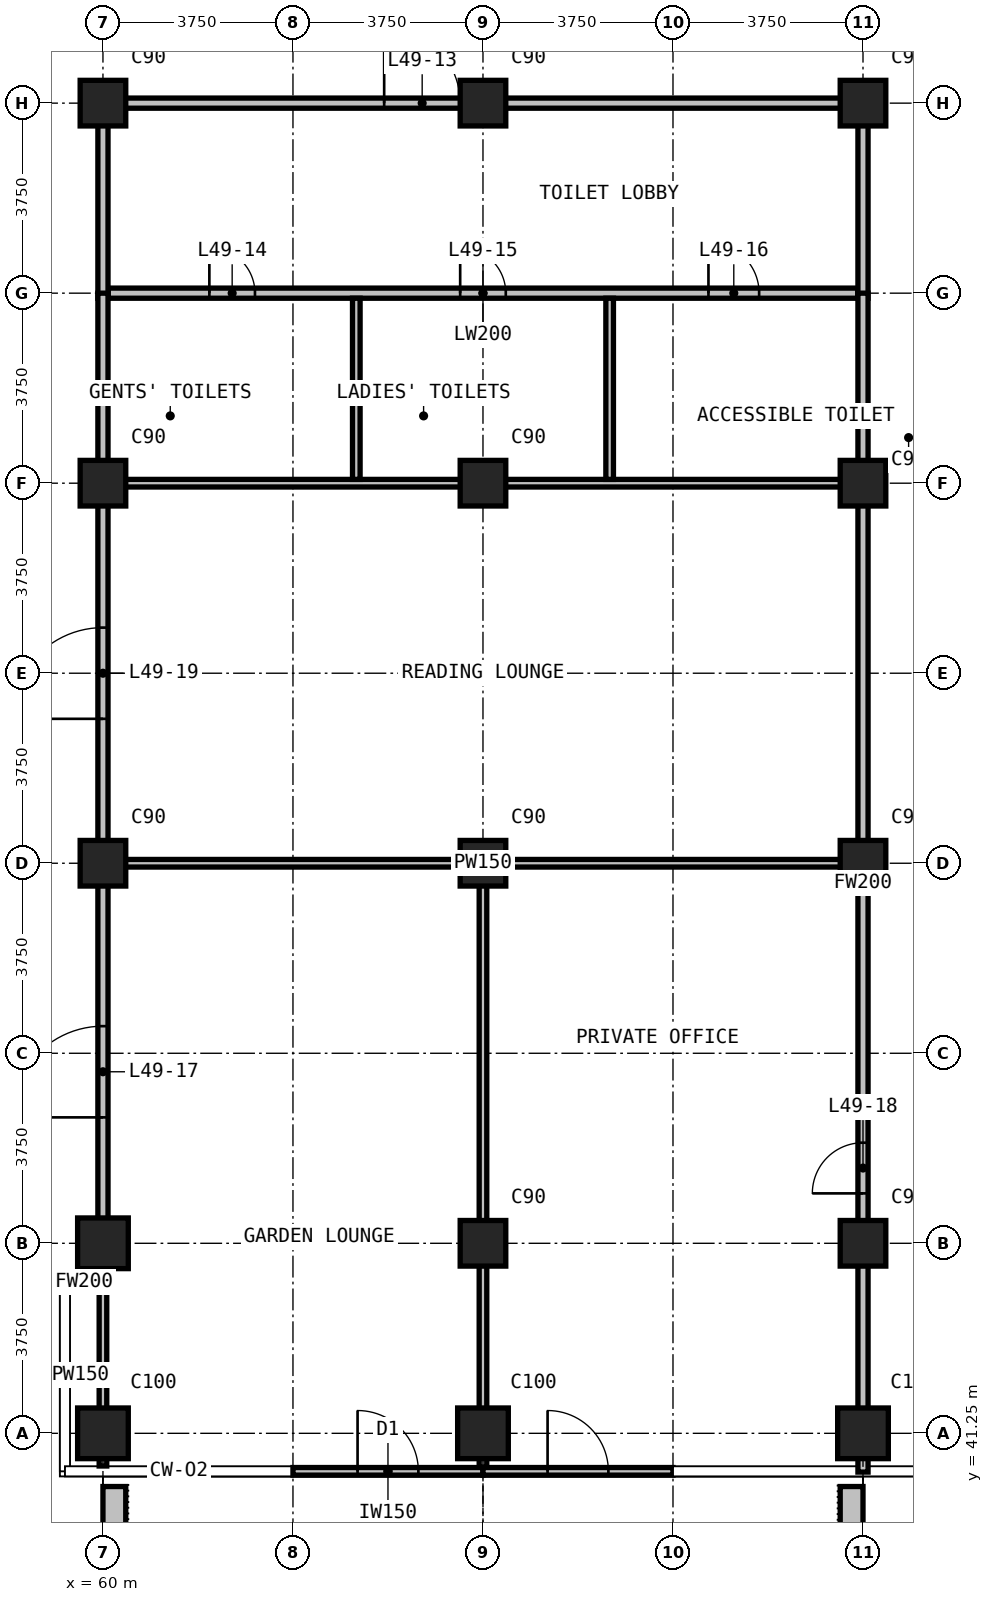
"""IFC4 building model, lengths in metres.
Left out: names, types, materials, properties, quantities, classifications, styles, units other than length and angle.
Written with IfcOpenShell. Run it as: python <this file> out.ifc"""

import sys

from ifc_helpers import new_model, si_unit, direction, frame, frame_2d, origin, origin_2d, place, context, subcontext, project, spatial, rectangle, extrude, element, fill, save


model = new_model("IFC4")
c1 = context("Model", 3, precision=1e-05, world=origin(), true_north=direction((0.0, 1.0)))
c2 = subcontext(c1, "Body", "Model", "MODEL_VIEW")
j1 = project(units=[si_unit("LENGTHUNIT", "METRE"), si_unit("PLANEANGLEUNIT", "RADIAN")], contexts=[c1])
p1 = place(None, origin())
s1 = spatial("IfcSite", under=j1, at=p1, CompositionType="ELEMENT")
p2 = place(p1, origin())
s2 = spatial("IfcBuilding", under=s1, at=p2, CompositionType="ELEMENT")
p3 = place(p2, frame((0.0, 0.0, 192.3)))
s3 = spatial("IfcBuildingStorey", under=s2, at=p3, CompositionType="ELEMENT", Elevation=192.3)
for number, where, z_axis, x_axis in (
    (1, (60.0, 41.25, 0.0), (0.0, 0.0, 1.0), (1.0, 0.0, 0.0)),
    (2, (60.0, 45.0, 0.0), (0.0, 0.0, 1.0), (1.0, 0.0, 0.0)),
):
    element("IfcColumn", number, at=place(p3, frame(where, z_axis=z_axis, x_axis=x_axis)), inside=s3, PredefinedType="COLUMN", context=c2, shape_type="SweptSolid", body=[
        extrude(rectangle(XDim=1.0, YDim=1.0, at=origin_2d()), origin(), (0.0, 0.0, 1.0), 3.6),
    ])
for number, where, z_axis, x_axis in (
    (3, (60.0, 52.5, 0.0), (0.0, 0.0, 1.0), (1.0, 0.0, 0.0)),
    (4, (60.0, 60.0, 0.0), (0.0, 0.0, 1.0), (1.0, 0.0, 0.0)),
    (5, (60.0, 67.5, 0.0), (0.0, 0.0, 1.0), (1.0, 0.0, 0.0)),
):
    element("IfcColumn", number, at=place(p3, frame(where, z_axis=z_axis, x_axis=x_axis)), inside=s3, PredefinedType="COLUMN", context=c2, shape_type="SweptSolid", body=[
        extrude(rectangle(XDim=0.9, YDim=0.9, at=origin_2d()), origin(), (0.0, 0.0, 1.0), 3.6),
    ])
p4 = place(p3, frame((67.5, 41.25, 0.0), z_axis=(0.0, 0.0, 1.0), x_axis=(1.0, 0.0, 0.0)))
e6 = element("IfcColumn", 6, at=p4, inside=s3, PredefinedType="COLUMN", context=c2, shape_type="SweptSolid", body=[
    extrude(rectangle(XDim=1.0, YDim=1.0, at=origin_2d()), origin(), (0.0, 0.0, 1.0), 3.6),
])
for number, where, z_axis, x_axis in (
    (7, (67.5, 45.0, 0.0), (0.0, 0.0, 1.0), (1.0, 0.0, 0.0)),
    (8, (67.5, 52.5, 0.0), (0.0, 0.0, 1.0), (1.0, 0.0, 0.0)),
    (9, (67.5, 60.0, 0.0), (0.0, 0.0, 1.0), (1.0, 0.0, 0.0)),
    (10, (67.5, 67.5, 0.0), (0.0, 0.0, 1.0), (1.0, 0.0, 0.0)),
):
    element("IfcColumn", number, at=place(p3, frame(where, z_axis=z_axis, x_axis=x_axis)), inside=s3, PredefinedType="COLUMN", context=c2, shape_type="SweptSolid", body=[
        extrude(rectangle(XDim=0.9, YDim=0.9, at=origin_2d()), origin(), (0.0, 0.0, 1.0), 3.6),
    ])
p5 = place(p3, frame((75.0, 41.25, 0.0), z_axis=(0.0, 0.0, 1.0), x_axis=(1.0, 0.0, 0.0)))
e11 = element("IfcColumn", 11, at=p5, inside=s3, PredefinedType="COLUMN", context=c2, shape_type="SweptSolid", body=[
    extrude(rectangle(XDim=1.0, YDim=1.0, at=origin_2d()), origin(), (0.0, 0.0, 1.0), 3.6),
])
for number, where, z_axis, x_axis in (
    (12, (75.0, 45.0, 0.0), (0.0, 0.0, 1.0), (1.0, 0.0, 0.0)),
    (13, (75.0, 52.5, 0.0), (0.0, 0.0, 1.0), (1.0, 0.0, 0.0)),
    (14, (75.0, 60.0, 0.0), (0.0, 0.0, 1.0), (1.0, 0.0, 0.0)),
    (15, (75.0, 67.5, 0.0), (0.0, 0.0, 1.0), (1.0, 0.0, 0.0)),
):
    element("IfcColumn", number, at=place(p3, frame(where, z_axis=z_axis, x_axis=x_axis)), inside=s3, PredefinedType="COLUMN", context=c2, shape_type="SweptSolid", body=[
        extrude(rectangle(XDim=0.9, YDim=0.9, at=origin_2d()), origin(), (0.0, 0.0, 1.0), 3.6),
    ])
p6 = place(p3, frame((63.75, 40.5, 0.0), z_axis=(0.0, 0.0, 1.0), x_axis=(1.0, 0.0, 0.0)))
e16 = element("IfcWall", 16, at=p6, inside=s3, PredefinedType="SOLIDWALL", context=c2, shape_type="SweptSolid", body=[
    extrude(rectangle(XDim=3.75, YDim=0.15, at=frame_2d((1.875, 0.0))), origin(), (0.0, 0.0, 1.0), 3.3),
])
p7 = place(p6, frame((1.275, 0.0, 0.0)))
e17 = element("IfcOpeningElement", 17, at=p7, cuts=e16, PredefinedType="OPENING", context=c2, shape_type="SweptSolid", body=[
    extrude(rectangle(XDim=1.2, YDim=2.4, at=frame_2d((0.6, 1.2))), frame((0.0, 0.085, 0.0), z_axis=(0.0, -1.0, 0.0), x_axis=(1.0, 0.0, 0.0)), (0.0, 0.0, 1.0), 0.17),
])
p8 = place(p3, frame((67.5, 40.5, 0.0), z_axis=(0.0, 0.0, 1.0), x_axis=(1.0, 0.0, 0.0)))
e18 = element("IfcWall", 18, at=p8, inside=s3, PredefinedType="SOLIDWALL", context=c2, shape_type="SweptSolid", body=[
    extrude(rectangle(XDim=3.75, YDim=0.15, at=frame_2d((1.875, 0.0))), origin(), (0.0, 0.0, 1.0), 3.3),
])
p9 = place(p8, frame((1.275, 0.0, 0.0)))
e19 = element("IfcOpeningElement", 19, at=p9, cuts=e18, PredefinedType="OPENING", context=c2, shape_type="SweptSolid", body=[
    extrude(rectangle(XDim=1.2, YDim=2.4, at=frame_2d((0.6, 1.2))), frame((0.0, 0.085, 0.0), z_axis=(0.0, -1.0, 0.0), x_axis=(1.0, 0.0, 0.0)), (0.0, 0.0, 1.0), 0.17),
])
for number, where, z_axis, x_axis in (
    (20, (60.225, 40.2, 0.0), (0.0, 0.0, 1.0), (0.0, -1.0, 0.0)),
    (21, (74.775, 40.2, 0.0), (0.0, 0.0, 1.0), (0.0, -1.0, 0.0)),
):
    element("IfcWall", number, at=place(p3, frame(where, z_axis=z_axis, x_axis=x_axis)), inside=s3, PredefinedType="USERDEFINED", context=c2, shape_type="SweptSolid", body=[
        extrude(rectangle(XDim=2.35, YDim=0.45, at=frame_2d((1.175, 0.0))), origin(), (0.0, 0.0, 1.0), 1.1),
    ])
p10 = place(p3, frame((60.1, 63.75, 0.0), z_axis=(0.0, 0.0, 1.0), x_axis=(1.0, 0.0, 0.0)))
e22 = element("IfcWall", 22, at=p10, inside=s3, PredefinedType="PARTITIONING", context=c2, shape_type="SweptSolid", body=[
    extrude(rectangle(XDim=14.8, YDim=0.2, at=frame_2d((7.4, 0.0))), origin(), (0.0, 0.0, 1.0), 3.3),
])
p11 = place(p10, frame((2.0, 0.0, 0.0)))
e23 = element("IfcOpeningElement", 23, at=p11, cuts=e22, PredefinedType="OPENING", context=c2, shape_type="SweptSolid", body=[
    extrude(rectangle(XDim=0.9, YDim=2.2, at=frame_2d((0.45, 1.1))), frame((0.0, 0.11, 0.0), z_axis=(0.0, -1.0, 0.0), x_axis=(1.0, 0.0, 0.0)), (0.0, 0.0, 1.0), 0.22),
])
p12 = place(p10, frame((6.95, 0.0, 0.0)))
e24 = element("IfcOpeningElement", 24, at=p12, cuts=e22, PredefinedType="OPENING", context=c2, shape_type="SweptSolid", body=[
    extrude(rectangle(XDim=0.9, YDim=2.2, at=frame_2d((0.45, 1.1))), frame((0.0, 0.11, 0.0), z_axis=(0.0, -1.0, 0.0), x_axis=(1.0, 0.0, 0.0)), (0.0, 0.0, 1.0), 0.22),
])
p13 = place(p10, frame((11.85, 0.0, 0.0)))
e25 = element("IfcOpeningElement", 25, at=p13, cuts=e22, PredefinedType="OPENING", context=c2, shape_type="SweptSolid", body=[
    extrude(rectangle(XDim=1.0, YDim=2.2, at=frame_2d((0.5, 1.1))), frame((0.0, 0.11, 0.0), z_axis=(0.0, -1.0, 0.0), x_axis=(1.0, 0.0, 0.0)), (0.0, 0.0, 1.0), 0.22),
])
p14 = place(p3, frame((60.1, 67.5, 0.0), z_axis=(0.0, 0.0, 1.0), x_axis=(1.0, 0.0, 0.0)))
e26 = element("IfcWall", 26, at=p14, inside=s3, PredefinedType="PARTITIONING", context=c2, shape_type="SweptSolid", body=[
    extrude(rectangle(XDim=14.8, YDim=0.2, at=frame_2d((7.4, 0.0))), origin(), (0.0, 0.0, 1.0), 3.3),
])
p15 = place(p14, frame((5.45, 0.0, 0.0)))
e27 = element("IfcOpeningElement", 27, at=p15, cuts=e26, PredefinedType="OPENING", context=c2, shape_type="SweptSolid", body=[
    extrude(rectangle(XDim=1.5, YDim=2.2, at=frame_2d((0.75, 1.1))), frame((0.0, 0.11, 0.0), z_axis=(0.0, -1.0, 0.0), x_axis=(1.0, 0.0, 0.0)), (0.0, 0.0, 1.0), 0.22),
])
for number, where, z_axis, x_axis in (
    (28, (60.0, 63.65, 0.0), (0.0, 0.0, 1.0), (0.0, 1.0, 0.0)),
    (29, (75.0, 63.65, 0.0), (0.0, 0.0, 1.0), (0.0, 1.0, 0.0)),
):
    element("IfcWall", number, at=place(p3, frame(where, z_axis=z_axis, x_axis=x_axis)), inside=s3, PredefinedType="PARTITIONING", context=c2, shape_type="SweptSolid", body=[
        extrude(rectangle(XDim=3.95, YDim=0.2, at=frame_2d((1.975, 0.0))), origin(), (0.0, 0.0, 1.0), 3.3),
    ])
p16 = place(p3, frame((59.355, 44.235, 0.0), z_axis=(0.0, 0.0, 1.0), x_axis=(1.0, 0.0, 0.0)))
e30 = element("IfcWall", 30, at=p16, inside=s3, PredefinedType="PARTITIONING", context=c2, shape_type="SweptSolid", body=[
    extrude(rectangle(XDim=0.545, YDim=0.2, at=frame_2d((0.272, 0.0))), origin(), (0.0, 0.0, 1.0), 3.3),
])
p17 = place(p3, frame((60.0, 44.135, 0.0), z_axis=(0.0, 0.0, 1.0), x_axis=(0.0, 1.0, 0.0)))
e31 = element("IfcWall", 31, at=p17, inside=s3, PredefinedType="PARTITIONING", context=c2, shape_type="SweptSolid", body=[
    extrude(rectangle(XDim=19.615, YDim=0.2, at=frame_2d((9.808, 0.0))), origin(), (0.0, 0.0, 1.0), 3.3),
])
p18 = place(p17, frame((3.35, 0.0, 0.0)))
e32 = element("IfcOpeningElement", 32, at=p18, cuts=e31, PredefinedType="OPENING", context=c2, shape_type="SweptSolid", body=[
    extrude(rectangle(XDim=1.8, YDim=2.2, at=frame_2d((0.9, 1.1))), frame((0.0, 0.11, 0.0), z_axis=(0.0, -1.0, 0.0), x_axis=(1.0, 0.0, 0.0)), (0.0, 0.0, 1.0), 0.22),
])
p19 = place(p17, frame((11.215, 0.0, 0.0)))
e33 = element("IfcOpeningElement", 33, at=p19, cuts=e31, PredefinedType="OPENING", context=c2, shape_type="SweptSolid", body=[
    extrude(rectangle(XDim=1.8, YDim=2.2, at=frame_2d((0.9, 1.1))), frame((0.0, 0.11, 0.0), z_axis=(0.0, -1.0, 0.0), x_axis=(1.0, 0.0, 0.0)), (0.0, 0.0, 1.0), 0.22),
])
p20 = place(p3, frame((75.0, 40.485, 0.0), z_axis=(0.0, 0.0, 1.0), x_axis=(0.0, 1.0, 0.0)))
e34 = element("IfcWall", 34, at=p20, inside=s3, PredefinedType="PARTITIONING", context=c2, shape_type="SweptSolid", body=[
    extrude(rectangle(XDim=23.265, YDim=0.2, at=frame_2d((11.632, 0.0))), origin(), (0.0, 0.0, 1.0), 3.3),
])
p21 = place(p20, frame((5.5, 0.0, 0.0)))
e35 = element("IfcOpeningElement", 35, at=p21, cuts=e34, PredefinedType="OPENING", context=c2, shape_type="SweptSolid", body=[
    extrude(rectangle(XDim=1.0, YDim=2.2, at=frame_2d((0.5, 1.1))), frame((0.0, 0.11, 0.0), z_axis=(0.0, -1.0, 0.0), x_axis=(1.0, 0.0, 0.0)), (0.0, 0.0, 1.0), 0.22),
])
for number, where, z_axis, x_axis in (
    (36, (60.1, 52.5, 0.0), (0.0, 0.0, 1.0), (1.0, 0.0, 0.0)),
    (37, (60.1, 60.0, 0.0), (0.0, 0.0, 1.0), (1.0, 0.0, 0.0)),
):
    element("IfcWall", number, at=place(p3, frame(where, z_axis=z_axis, x_axis=x_axis)), inside=s3, PredefinedType="PARTITIONING", context=c2, shape_type="SweptSolid", body=[
        extrude(rectangle(XDim=14.8, YDim=0.15, at=frame_2d((7.4, 0.0))), origin(), (0.0, 0.0, 1.0), 3.3),
    ])
p22 = place(p3, frame((60.0, 40.605, 0.0), z_axis=(0.0, 0.0, 1.0), x_axis=(0.0, 1.0, 0.0)))
e38 = element("IfcWall", 38, at=p22, inside=s3, PredefinedType="PARTITIONING", context=c2, shape_type="SweptSolid", body=[
    extrude(rectangle(XDim=3.6, YDim=0.15, at=frame_2d((1.8, 0.0))), origin(), (0.0, 0.0, 1.0), 3.3),
])
p23 = place(p3, frame((65.0, 60.075, 0.0), z_axis=(0.0, 0.0, 1.0), x_axis=(0.0, 1.0, 0.0)))
e39 = element("IfcWall", 39, at=p23, inside=s3, PredefinedType="PARTITIONING", context=c2, shape_type="SweptSolid", body=[
    extrude(rectangle(XDim=3.575, YDim=0.15, at=frame_2d((1.788, 0.0))), origin(), (0.0, 0.0, 1.0), 3.3),
])
p24 = place(p3, frame((67.5, 40.585, 0.0), z_axis=(0.0, 0.0, 1.0), x_axis=(0.0, 1.0, 0.0)))
e40 = element("IfcWall", 40, at=p24, inside=s3, PredefinedType="PARTITIONING", context=c2, shape_type="SweptSolid", body=[
    extrude(rectangle(XDim=11.84, YDim=0.15, at=frame_2d((5.92, 0.0))), origin(), (0.0, 0.0, 1.0), 3.3),
])
p25 = place(p3, frame((70.0, 60.075, 0.0), z_axis=(0.0, 0.0, 1.0), x_axis=(0.0, 1.0, 0.0)))
e41 = element("IfcWall", 41, at=p25, inside=s3, PredefinedType="PARTITIONING", context=c2, shape_type="SweptSolid", body=[
    extrude(rectangle(XDim=3.575, YDim=0.15, at=frame_2d((1.788, 0.0))), origin(), (0.0, 0.0, 1.0), 3.3),
])
p26 = place(p7, origin())
e42 = element("IfcDoor", 42, at=p26, inside=s3, OperationType="SINGLE_SWING_LEFT", PredefinedType="DOOR", context=c2, shape_type="SweptSolid", body=[
    extrude(rectangle(XDim=1.2, YDim=2.4, at=frame_2d((0.6, 1.2))), frame((0.0, 0.025, 0.0), z_axis=(0.0, -1.0, 0.0), x_axis=(1.0, 0.0, 0.0)), (0.0, 0.0, 1.0), 0.05),
])
fill(e17, e42)
p27 = place(p9, origin())
e43 = element("IfcDoor", 43, at=p27, inside=s3, OperationType="SINGLE_SWING_LEFT", PredefinedType="DOOR", context=c2, shape_type="SweptSolid", body=[
    extrude(rectangle(XDim=1.2, YDim=2.4, at=frame_2d((0.6, 1.2))), frame((0.0, 0.025, 0.0), z_axis=(0.0, -1.0, 0.0), x_axis=(1.0, 0.0, 0.0)), (0.0, 0.0, 1.0), 0.05),
])
fill(e19, e43)
p28 = place(p15, origin())
e44 = element("IfcDoor", 44, at=p28, inside=s3, OperationType="DOUBLE_DOOR_SINGLE_SWING", PredefinedType="DOOR", context=c2, shape_type="SweptSolid", body=[
    extrude(rectangle(XDim=1.5, YDim=2.2, at=frame_2d((0.75, 1.1))), frame((0.0, 0.025, 0.0), z_axis=(0.0, -1.0, 0.0), x_axis=(1.0, 0.0, 0.0)), (0.0, 0.0, 1.0), 0.05),
])
fill(e27, e44)
p29 = place(p11, origin())
e45 = element("IfcDoor", 45, at=p29, inside=s3, OperationType="SINGLE_SWING_LEFT", PredefinedType="DOOR", context=c2, shape_type="SweptSolid", body=[
    extrude(rectangle(XDim=0.9, YDim=2.2, at=frame_2d((0.45, 1.1))), frame((0.0, 0.025, 0.0), z_axis=(0.0, -1.0, 0.0), x_axis=(1.0, 0.0, 0.0)), (0.0, 0.0, 1.0), 0.05),
])
fill(e23, e45)
p30 = place(p12, origin())
e46 = element("IfcDoor", 46, at=p30, inside=s3, OperationType="SINGLE_SWING_RIGHT", PredefinedType="DOOR", context=c2, shape_type="SweptSolid", body=[
    extrude(rectangle(XDim=0.9, YDim=2.2, at=frame_2d((0.45, 1.1))), frame((0.0, 0.025, 0.0), z_axis=(0.0, -1.0, 0.0), x_axis=(1.0, 0.0, 0.0)), (0.0, 0.0, 1.0), 0.05),
])
fill(e24, e46)
p31 = place(p13, origin())
e47 = element("IfcDoor", 47, at=p31, inside=s3, OperationType="SINGLE_SWING_RIGHT", PredefinedType="DOOR", context=c2, shape_type="SweptSolid", body=[
    extrude(rectangle(XDim=1.0, YDim=2.2, at=frame_2d((0.5, 1.1))), frame((0.0, 0.025, 0.0), z_axis=(0.0, -1.0, 0.0), x_axis=(1.0, 0.0, 0.0)), (0.0, 0.0, 1.0), 0.05),
])
fill(e25, e47)
p32 = place(p18, origin())
e48 = element("IfcDoor", 48, at=p32, inside=s3, OperationType="DOUBLE_DOOR_SINGLE_SWING", PredefinedType="DOOR", context=c2, shape_type="SweptSolid", body=[
    extrude(rectangle(XDim=1.8, YDim=2.2, at=frame_2d((0.9, 1.1))), frame((0.0, 0.025, 0.0), z_axis=(0.0, -1.0, 0.0), x_axis=(1.0, 0.0, 0.0)), (0.0, 0.0, 1.0), 0.05),
])
fill(e32, e48)
p33 = place(p21, origin())
e49 = element("IfcDoor", 49, at=p33, inside=s3, OperationType="SINGLE_SWING_RIGHT", PredefinedType="DOOR", context=c2, shape_type="SweptSolid", body=[
    extrude(rectangle(XDim=1.0, YDim=2.2, at=frame_2d((0.5, 1.1))), frame((0.0, 0.025, 0.0), z_axis=(0.0, -1.0, 0.0), x_axis=(1.0, 0.0, 0.0)), (0.0, 0.0, 1.0), 0.05),
])
fill(e35, e49)
p34 = place(p19, origin())
e50 = element("IfcDoor", 50, at=p34, inside=s3, OperationType="DOUBLE_DOOR_SINGLE_SWING", PredefinedType="DOOR", context=c2, shape_type="SweptSolid", body=[
    extrude(rectangle(XDim=1.8, YDim=2.2, at=frame_2d((0.9, 1.1))), frame((0.0, 0.025, 0.0), z_axis=(0.0, -1.0, 0.0), x_axis=(1.0, 0.0, 0.0)), (0.0, 0.0, 1.0), 0.05),
])
fill(e33, e50)
save(model, sys.argv[1])
